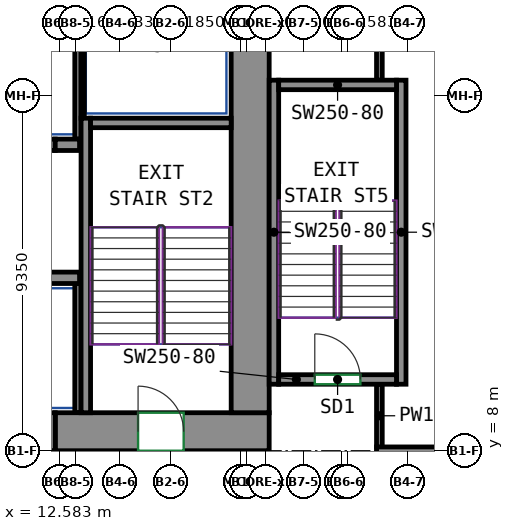
"""IFC4 building model, lengths in metres.
Left out: names, types, materials, properties, quantities, classifications, styles, units other than length and angle.
Written with IfcOpenShell. Run it as: python <this file> out.ifc"""

import sys

from ifc_helpers import new_model, si_unit, direction, frame, frame_2d, origin, place, context, subcontext, project, spatial, rectangle, extrude, source, transform, mapped, element, fill, save


model = new_model("IFC4")
c1 = context("Model", 3, precision=1e-05, world=origin(), true_north=direction((0.0, 1.0)))
c2 = subcontext(c1, "Body", "Model", "MODEL_VIEW")
j1 = project(units=[si_unit("LENGTHUNIT", "METRE"), si_unit("PLANEANGLEUNIT", "RADIAN")], contexts=[c1])
p1 = place(None, origin())
s1 = spatial("IfcSite", under=j1, at=p1, CompositionType="ELEMENT")
p2 = place(p1, origin())
s2 = spatial("IfcBuilding", under=s1, at=p2, CompositionType="ELEMENT")
p3 = place(p2, frame((0.0, 0.0, 31.0)))
s3 = spatial("IfcBuildingStorey", under=s2, at=p3, CompositionType="ELEMENT", Elevation=31.0)
m1 = source(origin(), c2, "Body", "SweptSolid", [
    extrude(rectangle(XDim=5.63, YDim=1.0, at=frame_2d((2.815, 0.0))), origin(), (0.0, 0.0, 1.0), 3.72),
])
p4 = place(p3, frame((12.47, 8.5, 0.0), z_axis=(0.0, 0.0, 1.0), x_axis=(1.0, 0.0, 0.0)))
e1 = element("IfcWall", 1, at=p4, inside=s3, PredefinedType="SHEAR", context=c2, shape_type="MappedRepresentation", body=[
    mapped(m1, transform((0.0, 0.0, 0.0))),
])
p5 = place(p4, frame((2.18, 0.0, 0.0)))
e2 = element("IfcOpeningElement", 2, at=p5, cuts=e1, PredefinedType="OPENING", context=c2, shape_type="SweptSolid", body=[
    extrude(rectangle(XDim=1.2, YDim=2.1, at=frame_2d((0.6, 1.05))), frame((0.0, 0.51, 0.0), z_axis=(0.0, -1.0, 0.0), x_axis=(1.0, 0.0, 0.0)), (0.0, 0.0, 1.0), 1.02),
])
m2 = source(origin(), c2, "Body", "SweptSolid", [
    extrude(rectangle(XDim=12.0, YDim=1.0, at=frame_2d((6.0, 0.0))), origin(), (0.0, 0.0, 1.0), 3.72),
])
p6 = place(p3, frame((17.6, 9.0, 0.0), z_axis=(0.0, 0.0, 1.0), x_axis=(0.0, 1.0, 0.0)))
e3 = element("IfcWall", 3, at=p6, inside=s3, PredefinedType="SHEAR", context=c2, shape_type="MappedRepresentation", body=[
    mapped(m2, transform((0.0, 0.0, 0.0))),
])
m3 = source(origin(), c2, "Body", "SweptSolid", [
    extrude(rectangle(XDim=7.75, YDim=0.25, at=frame_2d((3.875, 0.0))), origin(), (0.0, 0.0, 1.0), 3.72),
])
p7 = place(p3, frame((13.275, 9.0, 0.0), z_axis=(0.0, 0.0, 1.0), x_axis=(0.0, 1.0, 0.0)))
e4 = element("IfcWall", 4, at=p7, inside=s3, PredefinedType="SHEAR", context=c2, shape_type="MappedRepresentation", body=[
    mapped(m3, transform((0.0, 0.0, 0.0))),
])
m4 = source(origin(), c2, "Body", "SweptSolid", [
    extrude(rectangle(XDim=3.7, YDim=0.25, at=frame_2d((1.85, 0.0))), origin(), (0.0, 0.0, 1.0), 3.72),
])
p8 = place(p3, frame((13.4, 16.625, 0.0), z_axis=(0.0, 0.0, 1.0), x_axis=(1.0, 0.0, 0.0)))
e5 = element("IfcWall", 5, at=p8, inside=s3, PredefinedType="SHEAR", context=c2, shape_type="MappedRepresentation", body=[
    mapped(m4, transform((0.0, 0.0, 0.0))),
])
m5 = source(origin(), c2, "Body", "SweptSolid", [
    extrude(rectangle(XDim=8.0, YDim=0.25, at=frame_2d((4.0, 0.0))), origin(), (0.0, 0.0, 1.0), 3.72),
])
for number, where, z_axis, x_axis in (
    (6, (18.225, 9.75, 0.0), (0.0, 0.0, 1.0), (0.0, 1.0, 0.0)),
    (7, (21.575, 9.75, 0.0), (0.0, 0.0, 1.0), (0.0, 1.0, 0.0)),
):
    element("IfcWall", number, at=place(p3, frame(where, z_axis=z_axis, x_axis=x_axis)), inside=s3, PredefinedType="SHEAR", context=c2, shape_type="MappedRepresentation", body=[
        mapped(m5, transform((0.0, 0.0, 0.0))),
    ])
m6 = source(origin(), c2, "Body", "SweptSolid", [
    extrude(rectangle(XDim=3.1, YDim=0.25, at=frame_2d((1.55, 0.0))), origin(), (0.0, 0.0, 1.0), 3.72),
])
p9 = place(p3, frame((18.35, 9.875, 0.0), z_axis=(0.0, 0.0, 1.0), x_axis=(1.0, 0.0, 0.0)))
e8 = element("IfcWall", 8, at=p9, inside=s3, PredefinedType="SHEAR", context=c2, shape_type="MappedRepresentation", body=[
    mapped(m6, transform((0.0, 0.0, 0.0))),
])
p10 = place(p9, frame((0.95, 0.0, 0.0)))
e9 = element("IfcOpeningElement", 9, at=p10, cuts=e8, PredefinedType="OPENING", context=c2, shape_type="SweptSolid", body=[
    extrude(rectangle(XDim=1.2, YDim=2.1, at=frame_2d((0.6, 1.05))), frame((0.0, 0.135, 0.0), z_axis=(0.0, -1.0, 0.0), x_axis=(1.0, 0.0, 0.0)), (0.0, 0.0, 1.0), 0.27),
])
p11 = place(p3, frame((18.35, 17.625, 0.0), z_axis=(0.0, 0.0, 1.0), x_axis=(1.0, 0.0, 0.0)))
e10 = element("IfcWall", 10, at=p11, inside=s3, PredefinedType="SHEAR", context=c2, shape_type="MappedRepresentation", body=[
    mapped(m6, transform((0.0, 0.0, 0.0))),
])
m7 = source(origin(), c2, "Body", "SweptSolid", [
    extrude(rectangle(XDim=2.82, YDim=0.3, at=frame_2d((1.41, 0.0))), origin(), (0.0, 0.0, 1.0), 3.72),
])
p12 = place(p3, frame((10.29, 12.55, 0.0), z_axis=(0.0, 0.0, 1.0), x_axis=(1.0, 0.0, 0.0)))
e11 = element("IfcWall", 11, at=p12, inside=s3, PredefinedType="SHEAR", context=c2, shape_type="MappedRepresentation", body=[
    mapped(m7, transform((0.0, 0.0, 0.0))),
])
m8 = source(origin(), c2, "Body", "SweptSolid", [
    extrude(rectangle(XDim=0.64, YDim=0.3, at=frame_2d((0.32, 0.0))), origin(), (0.0, 0.0, 1.0), 3.72),
])
p13 = place(p3, frame((12.47, 16.05, 0.0), z_axis=(0.0, 0.0, 1.0), x_axis=(1.0, 0.0, 0.0)))
e12 = element("IfcWall", 12, at=p13, inside=s3, PredefinedType="SHEAR", context=c2, shape_type="MappedRepresentation", body=[
    mapped(m8, transform((0.0, 0.0, 0.0))),
])
m9 = source(origin(), c2, "Body", "SweptSolid", [
    extrude(rectangle(XDim=1.4, YDim=0.3, at=frame_2d((0.7, 0.0))), origin(), (0.0, 0.0, 1.0), 3.72),
])
p14 = place(p3, frame((11.07, 16.05, 0.0), z_axis=(0.0, 0.0, 1.0), x_axis=(1.0, 0.0, 0.0)))
e13 = element("IfcWall", 13, at=p14, inside=s3, PredefinedType="PARTITIONING", context=c2, shape_type="MappedRepresentation", body=[
    mapped(m9, transform((0.0, 0.0, 0.0))),
])
p15 = place(p14, frame((0.15, 0.0, 0.0)))
e14 = element("IfcOpeningElement", 14, at=p15, cuts=e13, PredefinedType="OPENING", context=c2, shape_type="SweptSolid", body=[
    extrude(rectangle(XDim=1.1, YDim=2.1, at=frame_2d((0.55, 1.05))), frame((0.0, 0.16, 0.0), z_axis=(0.0, -1.0, 0.0), x_axis=(1.0, 0.0, 0.0)), (0.0, 0.0, 1.0), 0.32),
])
m10 = source(origin(), c2, "Body", "SweptSolid", [
    extrude(rectangle(XDim=3.275, YDim=0.165, at=frame_2d((1.638, 0.0))), origin(), (0.0, 0.0, 1.0), 3.72),
])
p16 = place(p3, frame((13.067, 16.2, 0.0), z_axis=(0.0, 0.0, 1.0), x_axis=(0.0, 1.0, 0.0)))
e15 = element("IfcWall", 15, at=p16, inside=s3, PredefinedType="PARTITIONING", context=c2, shape_type="MappedRepresentation", body=[
    mapped(m10, transform((0.0, 0.0, 0.0))),
])
m11 = source(origin(), c2, "Body", "SweptSolid", [
    extrude(rectangle(XDim=2.725, YDim=0.085, at=frame_2d((1.363, 0.0))), origin(), (0.0, 0.0, 1.0), 3.72),
])
p17 = place(p3, frame((13.192, 16.75, 0.0), z_axis=(0.0, 0.0, 1.0), x_axis=(0.0, 1.0, 0.0)))
e16 = element("IfcWall", 16, at=p17, inside=s3, PredefinedType="PARTITIONING", context=c2, shape_type="MappedRepresentation", body=[
    mapped(m11, transform((0.0, 0.0, 0.0))),
])
m12 = source(origin(), c2, "Body", "SweptSolid", [
    extrude(rectangle(XDim=3.4, YDim=0.165, at=frame_2d((1.7, 0.0))), origin(), (0.0, 0.0, 1.0), 3.72),
])
p18 = place(p3, frame((13.067, 9.0, 0.0), z_axis=(0.0, 0.0, 1.0), x_axis=(0.0, 1.0, 0.0)))
e17 = element("IfcWall", 17, at=p18, inside=s3, PredefinedType="PARTITIONING", context=c2, shape_type="MappedRepresentation", body=[
    mapped(m12, transform((0.0, 0.0, 0.0))),
])
m13 = source(origin(), c2, "Body", "SweptSolid", [
    extrude(rectangle(XDim=1.4, YDim=1.0, at=frame_2d((0.7, 0.0))), origin(), (0.0, 0.0, 1.0), 2.7),
])
p19 = place(p3, frame((11.07, 8.5, 0.0), z_axis=(0.0, 0.0, 1.0), x_axis=(1.0, 0.0, 0.0)))
e18 = element("IfcWall", 18, at=p19, inside=s3, PredefinedType="PARTITIONING", context=c2, shape_type="MappedRepresentation", body=[
    mapped(m13, transform((0.0, 0.0, 0.0))),
])
p20 = place(p19, frame((0.25, 0.0, 0.0)))
e19 = element("IfcOpeningElement", 19, at=p20, cuts=e18, PredefinedType="OPENING", context=c2, shape_type="SweptSolid", body=[
    extrude(rectangle(XDim=0.9, YDim=2.1, at=frame_2d((0.45, 1.05))), frame((0.0, 0.51, 0.0), z_axis=(0.0, -1.0, 0.0), x_axis=(1.0, 0.0, 0.0)), (0.0, 0.0, 1.0), 1.02),
])
p21 = place(p3, frame((21.0, 17.75, 0.0), z_axis=(0.0, 0.0, 1.0), x_axis=(0.0, 1.0, 0.0)))
e20 = element("IfcWall", 20, at=p21, inside=s3, PredefinedType="PARTITIONING", context=c2, shape_type="SweptSolid", body=[
    extrude(rectangle(XDim=6.675, YDim=0.15, at=frame_2d((3.337, 0.0))), origin(), (0.0, 0.0, 1.0), 3.72),
])
p22 = place(p3, frame((21.0, 8.09, 0.0), z_axis=(0.0, 0.0, 1.0), x_axis=(0.0, 1.0, 0.0)))
e21 = element("IfcWall", 21, at=p22, inside=s3, PredefinedType="PARTITIONING", context=c2, shape_type="SweptSolid", body=[
    extrude(rectangle(XDim=1.66, YDim=0.15, at=frame_2d((0.83, 0.0))), origin(), (0.0, 0.0, 1.0), 3.72),
])
p23 = place(p3, frame((20.926, 8.0, 0.0), z_axis=(0.0, 0.0, 1.0), x_axis=(1.0, 0.0, 0.0)))
e22 = element("IfcWall", 22, at=p23, inside=s3, PredefinedType="PARTITIONING", context=c2, shape_type="SweptSolid", body=[
    extrude(rectangle(XDim=6.174, YDim=0.2, at=frame_2d((3.087, 0.0))), origin(), (0.0, 0.0, 1.0), 3.72),
])
p24 = place(p5, origin())
e23 = element("IfcDoor", 23, at=p24, inside=s3, OperationType="DOUBLE_DOOR_SINGLE_SWING", PredefinedType="DOOR", context=c2, shape_type="SweptSolid", body=[
    extrude(rectangle(XDim=1.2, YDim=2.1, at=frame_2d((0.6, 1.05))), frame((0.0, 0.405, 0.0), z_axis=(0.0, -1.0, 0.0), x_axis=(1.0, 0.0, 0.0)), (0.0, 0.0, 1.0), 0.05),
])
fill(e2, e23)
p25 = place(p10, origin())
e24 = element("IfcDoor", 24, at=p25, inside=s3, OperationType="DOUBLE_DOOR_SINGLE_SWING", PredefinedType="DOOR", context=c2, shape_type="SweptSolid", body=[
    extrude(rectangle(XDim=1.2, YDim=2.1, at=frame_2d((0.6, 1.05))), frame((0.0, 0.025, 0.0), z_axis=(0.0, -1.0, 0.0), x_axis=(1.0, 0.0, 0.0)), (0.0, 0.0, 1.0), 0.05),
])
fill(e9, e24)
save(model, sys.argv[1])
